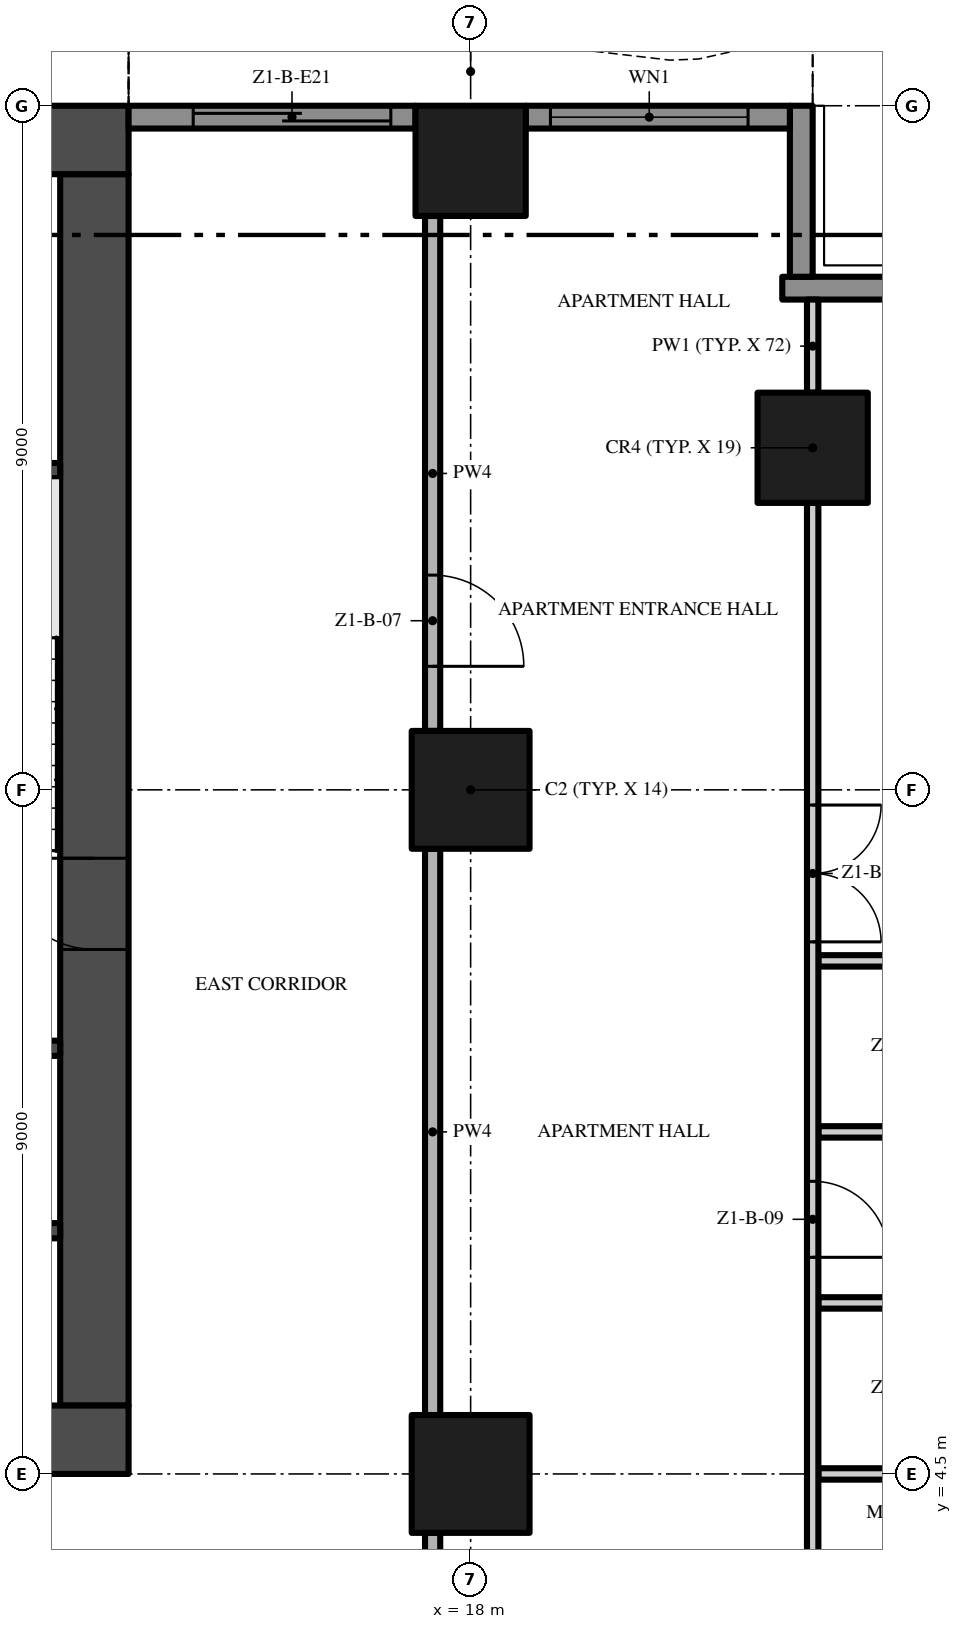
"""IFC4 building model, lengths in metres.
Left out: names, types, materials, properties, quantities, classifications, styles, units other than length and angle.
Written with IfcOpenShell. Run it as: python <this file> out.ifc"""

import sys

from ifc_helpers import new_model, si_unit, direction, frame, frame_2d, origin, origin_2d, place, context, subcontext, project, spatial, polyline, rectangle, outline, extrude, element, fill, save


model = new_model("IFC4")
c1 = context("Model", 3, precision=1e-05, world=origin(), true_north=direction((0.0, 1.0)))
c2 = subcontext(c1, "Body", "Model", "MODEL_VIEW")
j1 = project(units=[si_unit("LENGTHUNIT", "METRE"), si_unit("PLANEANGLEUNIT", "RADIAN")], contexts=[c1])
p1 = place(None, origin())
s1 = spatial("IfcSite", under=j1, at=p1, CompositionType="ELEMENT")
p2 = place(p1, origin())
s2 = spatial("IfcBuilding", under=s1, at=p2, CompositionType="ELEMENT")
p3 = place(p2, frame((0.0, 0.0, 34.0)))
s3 = spatial("IfcBuildingStorey", under=s2, at=p3, CompositionType="ELEMENT", Elevation=34.0)
p4 = place(p3, frame((-13.5, 4.95, -0.3), z_axis=(0.0, 0.0, 1.0), x_axis=(1.0, 0.0, 0.0)))
e1 = element("IfcWall", 1, at=p4, inside=s3, PredefinedType="SHEAR", context=c2, shape_type="SweptSolid", body=[
    extrude(rectangle(XDim=27.0, YDim=0.9, at=frame_2d((13.5, 0.0))), origin(), (0.0, 0.0, 1.0), 3.8),
])
p5 = place(p4, frame((12.0, 0.0, 0.3)))
e2 = element("IfcOpeningElement", 2, at=p5, cuts=e1, PredefinedType="OPENING", context=c2, shape_type="SweptSolid", body=[
    extrude(rectangle(XDim=3.0, YDim=2.4, at=frame_2d((1.5, 1.2))), frame((0.0, 0.46, 0.0), z_axis=(0.0, -1.0, 0.0), x_axis=(1.0, 0.0, 0.0)), (0.0, 0.0, 1.0), 0.92),
])
p6 = place(p4, frame((4.9, 0.0, 0.3)))
e3 = element("IfcOpeningElement", 3, at=p6, cuts=e1, PredefinedType="OPENING", context=c2, shape_type="SweptSolid", body=[
    extrude(rectangle(XDim=1.2, YDim=2.2, at=frame_2d((0.6, 1.1))), frame((0.0, 0.46, 0.0), z_axis=(0.0, -1.0, 0.0), x_axis=(1.0, 0.0, 0.0)), (0.0, 0.0, 1.0), 0.92),
])
p7 = place(p4, frame((20.75, 0.0, 0.3)))
e4 = element("IfcOpeningElement", 4, at=p7, cuts=e1, PredefinedType="OPENING", context=c2, shape_type="SweptSolid", body=[
    extrude(rectangle(XDim=1.5, YDim=2.2, at=frame_2d((0.75, 1.1))), frame((0.0, 0.46, 0.0), z_axis=(0.0, -1.0, 0.0), x_axis=(1.0, 0.0, 0.0)), (0.0, 0.0, 1.0), 0.92),
])
p8 = place(p4, frame((17.4, 0.0, 0.3)))
e5 = element("IfcOpeningElement", 5, at=p8, cuts=e1, PredefinedType="OPENING", context=c2, shape_type="SweptSolid", body=[
    extrude(rectangle(XDim=1.2, YDim=2.2, at=frame_2d((0.6, 1.1))), frame((0.0, 0.46, 0.0), z_axis=(0.0, -1.0, 0.0), x_axis=(1.0, 0.0, 0.0)), (0.0, 0.0, 1.0), 0.92),
])
p9 = place(p3, frame((13.05, 5.4, -0.3), z_axis=(0.0, 0.0, 1.0), x_axis=(0.0, 1.0, 0.0)))
e6 = element("IfcWall", 6, at=p9, inside=s3, PredefinedType="SHEAR", context=c2, shape_type="SweptSolid", body=[
    extrude(rectangle(XDim=16.2, YDim=0.9, at=frame_2d((8.1, 0.0))), origin(), (0.0, 0.0, 1.0), 3.8),
])
p10 = place(p9, frame((6.0, 0.0, 0.3)))
e7 = element("IfcOpeningElement", 7, at=p10, cuts=e6, PredefinedType="OPENING", context=c2, shape_type="SweptSolid", body=[
    extrude(rectangle(XDim=1.2, YDim=2.2, at=frame_2d((0.6, 1.1))), frame((0.0, 0.46, 0.0), z_axis=(0.0, -1.0, 0.0), x_axis=(1.0, 0.0, 0.0)), (0.0, 0.0, 1.0), 0.92),
])
p11 = place(p3, frame((13.5, 22.05, -0.3), z_axis=(0.0, 0.0, 1.0), x_axis=(-1.0, 0.0, 0.0)))
e8 = element("IfcWall", 8, at=p11, inside=s3, PredefinedType="SHEAR", context=c2, shape_type="SweptSolid", body=[
    extrude(rectangle(XDim=27.0, YDim=0.9, at=frame_2d((13.5, 0.0))), origin(), (0.0, 0.0, 1.0), 3.8),
])
p12 = place(p3, frame((18.0, 13.5, 0.0), z_axis=(0.0, 0.0, 1.0), x_axis=(1.0, 0.0, 0.0)))
e9 = element("IfcColumn", 9, at=p12, inside=s3, PredefinedType="COLUMN", context=c2, shape_type="SweptSolid", body=[
    extrude(rectangle(XDim=1.55, YDim=1.55, at=origin_2d()), origin(), (0.0, 0.0, 1.0), 3.5),
])
p13 = place(p3, frame((18.0, 21.775, 0.0), z_axis=(0.0, 0.0, 1.0), x_axis=(1.0, 0.0, 0.0)))
e10 = element("IfcColumn", 10, at=p13, inside=s3, PredefinedType="COLUMN", context=c2, shape_type="SweptSolid", body=[
    extrude(rectangle(XDim=1.45, YDim=1.45, at=origin_2d()), origin(), (0.0, 0.0, 1.0), 3.5),
])
p14 = place(p3, frame((18.0, 4.5, 0.0), z_axis=(0.0, 0.0, 1.0), x_axis=(1.0, 0.0, 0.0)))
e11 = element("IfcColumn", 11, at=p14, inside=s3, PredefinedType="COLUMN", context=c2, shape_type="SweptSolid", body=[
    extrude(rectangle(XDim=1.55, YDim=1.55, at=origin_2d()), origin(), (0.0, 0.0, 1.0), 3.5),
])
p15 = place(p3, frame((22.5, 18.0, 0.0), z_axis=(0.0, 0.0, 1.0), x_axis=(1.0, 0.0, 0.0)))
e12 = element("IfcColumn", 12, at=p15, inside=s3, PredefinedType="COLUMN", context=c2, shape_type="SweptSolid", body=[
    extrude(rectangle(XDim=1.45, YDim=1.45, at=origin_2d()), origin(), (0.0, 0.0, 1.0), 3.5),
])
p16 = place(p3, frame((22.1, 20.1, 0.0), z_axis=(0.0, 0.0, 1.0), x_axis=(1.0, 0.0, 0.0)))
e13 = element("IfcWall", 13, at=p16, inside=s3, PredefinedType="SOLIDWALL", context=c2, shape_type="SweptSolid", body=[
    extrude(rectangle(XDim=2.35, YDim=0.3, at=frame_2d((1.175, 0.0))), origin(), (0.0, 0.0, 1.0), 3.5),
])
p17 = place(p3, frame((22.35, 22.5, 0.0), z_axis=(0.0, 0.0, 1.0), x_axis=(0.0, -1.0, 0.0)))
e14 = element("IfcWall", 14, at=p17, inside=s3, PredefinedType="SOLIDWALL", context=c2, shape_type="SweptSolid", body=[
    extrude(rectangle(XDim=2.25, YDim=0.3, at=frame_2d((1.125, 0.0))), origin(), (0.0, 0.0, 1.0), 3.5),
])
p18 = place(p3, frame((18.725, 22.35, 0.0), z_axis=(0.0, 0.0, 1.0), x_axis=(1.0, 0.0, 0.0)))
e15 = element("IfcWall", 15, at=p18, inside=s3, PredefinedType="SOLIDWALL", context=c2, shape_type="SweptSolid", body=[
    extrude(rectangle(XDim=3.475, YDim=0.3, at=frame_2d((1.738, 0.0))), origin(), (0.0, 0.0, 1.0), 3.5),
])
p19 = place(p18, frame((0.325, 0.0, 0.45)))
e16 = element("IfcOpeningElement", 16, at=p19, cuts=e15, PredefinedType="OPENING", context=c2, shape_type="SweptSolid", body=[
    extrude(rectangle(XDim=2.6, YDim=2.65, at=frame_2d((1.3, 1.325))), frame((0.0, 0.16, 0.0), z_axis=(0.0, -1.0, 0.0), x_axis=(1.0, 0.0, 0.0)), (0.0, 0.0, 1.0), 0.32),
])
p20 = place(p3, frame((13.5, 22.35, 0.0), z_axis=(0.0, 0.0, 1.0), x_axis=(1.0, 0.0, 0.0)))
e17 = element("IfcWall", 17, at=p20, inside=s3, PredefinedType="SOLIDWALL", context=c2, shape_type="SweptSolid", body=[
    extrude(rectangle(XDim=3.775, YDim=0.3, at=frame_2d((1.887, 0.0))), origin(), (0.0, 0.0, 1.0), 3.5),
])
p21 = place(p20, frame((0.85, 0.0, 0.0)))
e18 = element("IfcOpeningElement", 18, at=p21, cuts=e17, PredefinedType="OPENING", context=c2, shape_type="SweptSolid", body=[
    extrude(rectangle(XDim=2.6, YDim=2.4, at=frame_2d((1.3, 1.2))), frame((0.0, 0.16, 0.0), z_axis=(0.0, -1.0, 0.0), x_axis=(1.0, 0.0, 0.0)), (0.0, 0.0, 1.0), 0.32),
])
p22 = place(p3, origin())
e19 = element("IfcWall", 19, at=p22, inside=s3, PredefinedType="USERDEFINED", context=c2, shape_type="SweptSolid", body=[
    extrude(outline(polyline([(22.5, 23.451), (21.0, 23.115), (20.625, 23.1), (19.5, 23.231), (18.0, 23.755), (16.5, 24.488), (15.0, 25.149), (13.5, 25.485), (13.445, 25.241), (14.921, 24.91), (16.395, 24.261), (17.904, 23.524), (19.444, 22.986), (20.615, 22.849), (21.033, 22.866), (22.555, 23.208), (22.5, 23.451)])), origin(), (0.0, 0.0, 1.0), 0.9),
])
for number, where, z_axis, x_axis in (
    (20, (9.65, 7.7, 0.0), (0.0, 0.0, 1.0), (1.0, 0.0, 0.0)),
    (21, (9.65, 10.1, 0.0), (0.0, 0.0, 1.0), (1.0, 0.0, 0.0)),
    (22, (9.65, 17.7, 0.0), (0.0, 0.0, 1.0), (1.0, 0.0, 0.0)),
):
    element("IfcWall", number, at=place(p3, frame(where, z_axis=z_axis, x_axis=x_axis)), inside=s3, PredefinedType="SHEAR", context=c2, shape_type="SweptSolid", body=[
        extrude(rectangle(XDim=2.95, YDim=0.2, at=frame_2d((1.475, 0.0))), origin(), (0.0, 0.0, 1.0), 3.5),
    ])
p23 = place(p3, frame((22.575, 4.5, 0.0), z_axis=(0.0, 0.0, 1.0), x_axis=(1.0, 0.0, 0.0)))
e23 = element("IfcWall", 23, at=p23, inside=s3, PredefinedType="PARTITIONING", context=c2, shape_type="SweptSolid", body=[
    extrude(rectangle(XDim=2.975, YDim=0.15, at=frame_2d((1.488, 0.0))), origin(), (0.0, 0.0, 1.0), 3.5),
])
p24 = place(p3, frame((22.575, 6.75, 0.0), z_axis=(0.0, 0.0, 1.0), x_axis=(1.0, 0.0, 0.0)))
e24 = element("IfcWall", 24, at=p24, inside=s3, PredefinedType="PARTITIONING", context=c2, shape_type="SweptSolid", body=[
    extrude(rectangle(XDim=1.875, YDim=0.15, at=frame_2d((0.938, 0.0))), origin(), (0.0, 0.0, 1.0), 3.5),
])
p25 = place(p3, frame((22.575, 9.0, 0.0), z_axis=(0.0, 0.0, 1.0), x_axis=(1.0, 0.0, 0.0)))
e25 = element("IfcWall", 25, at=p25, inside=s3, PredefinedType="PARTITIONING", context=c2, shape_type="SweptSolid", body=[
    extrude(rectangle(XDim=4.125, YDim=0.15, at=frame_2d((2.062, 0.0))), origin(), (0.0, 0.0, 1.0), 3.5),
])
p26 = place(p3, frame((22.575, 11.25, 0.0), z_axis=(0.0, 0.0, 1.0), x_axis=(1.0, 0.0, 0.0)))
e26 = element("IfcWall", 26, at=p26, inside=s3, PredefinedType="PARTITIONING", context=c2, shape_type="SweptSolid", body=[
    extrude(rectangle(XDim=1.875, YDim=0.15, at=frame_2d((0.938, 0.0))), origin(), (0.0, 0.0, 1.0), 3.5),
])
p27 = place(p3, frame((17.5, -0.2, 0.0), z_axis=(0.0, 0.0, 1.0), x_axis=(0.0, 1.0, 0.0)))
e27 = element("IfcWall", 27, at=p27, inside=s3, PredefinedType="PARTITIONING", context=c2, shape_type="SweptSolid", body=[
    extrude(rectangle(XDim=3.925, YDim=0.2, at=frame_2d((1.962, 0.0))), origin(), (0.0, 0.0, 1.0), 3.5),
])
p28 = place(p3, frame((17.5, 5.275, 0.0), z_axis=(0.0, 0.0, 1.0), x_axis=(0.0, 1.0, 0.0)))
e28 = element("IfcWall", 28, at=p28, inside=s3, PredefinedType="PARTITIONING", context=c2, shape_type="SweptSolid", body=[
    extrude(rectangle(XDim=7.45, YDim=0.2, at=frame_2d((3.725, 0.0))), origin(), (0.0, 0.0, 1.0), 3.5),
])
p29 = place(p3, frame((17.5, 21.05, 0.0), z_axis=(0.0, 0.0, 1.0), x_axis=(0.0, -1.0, 0.0)))
e29 = element("IfcWall", 29, at=p29, inside=s3, PredefinedType="PARTITIONING", context=c2, shape_type="SweptSolid", body=[
    extrude(rectangle(XDim=6.775, YDim=0.2, at=frame_2d((3.388, 0.0))), origin(), (0.0, 0.0, 1.0), 3.5),
])
p30 = place(p29, frame((4.725, 0.0, 0.0)))
e30 = element("IfcOpeningElement", 30, at=p30, cuts=e29, PredefinedType="OPENING", context=c2, shape_type="SweptSolid", body=[
    extrude(rectangle(XDim=1.2, YDim=2.4, at=frame_2d((0.6, 1.2))), frame((0.0, 0.11, 0.0), z_axis=(0.0, -1.0, 0.0), x_axis=(1.0, 0.0, 0.0)), (0.0, 0.0, 1.0), 0.22),
])
p31 = place(p3, frame((22.5, 17.275, 0.0), z_axis=(0.0, 0.0, 1.0), x_axis=(0.0, -1.0, 0.0)))
e31 = element("IfcWall", 31, at=p31, inside=s3, PredefinedType="PARTITIONING", context=c2, shape_type="SweptSolid", body=[
    extrude(rectangle(XDim=17.175, YDim=0.15, at=frame_2d((8.588, 0.0))), origin(), (0.0, 0.0, 1.0), 3.5),
])
p32 = place(p31, frame((14.525, 0.0, 0.0)))
e32 = element("IfcOpeningElement", 32, at=p32, cuts=e31, PredefinedType="OPENING", context=c2, shape_type="SweptSolid", body=[
    extrude(rectangle(XDim=1.0, YDim=2.4, at=frame_2d((0.5, 1.2))), frame((0.0, 0.085, 0.0), z_axis=(0.0, -1.0, 0.0), x_axis=(1.0, 0.0, 0.0)), (0.0, 0.0, 1.0), 0.17),
])
p33 = place(p31, frame((8.925, 0.0, 0.0)))
e33 = element("IfcOpeningElement", 33, at=p33, cuts=e31, PredefinedType="OPENING", context=c2, shape_type="SweptSolid", body=[
    extrude(rectangle(XDim=1.0, YDim=2.4, at=frame_2d((0.5, 1.2))), frame((0.0, 0.085, 0.0), z_axis=(0.0, -1.0, 0.0), x_axis=(1.0, 0.0, 0.0)), (0.0, 0.0, 1.0), 0.17),
])
p34 = place(p31, frame((3.975, 0.0, 0.0)))
e34 = element("IfcOpeningElement", 34, at=p34, cuts=e31, PredefinedType="OPENING", context=c2, shape_type="SweptSolid", body=[
    extrude(rectangle(XDim=1.8, YDim=2.4, at=frame_2d((0.9, 1.2))), frame((0.0, 0.085, 0.0), z_axis=(0.0, -1.0, 0.0), x_axis=(1.0, 0.0, 0.0)), (0.0, 0.0, 1.0), 0.17),
])
p35 = place(p3, frame((22.5, 18.725, 0.0), z_axis=(0.0, 0.0, 1.0), x_axis=(0.0, 1.0, 0.0)))
e35 = element("IfcWall", 35, at=p35, inside=s3, PredefinedType="PARTITIONING", context=c2, shape_type="SweptSolid", body=[
    extrude(rectangle(XDim=1.225, YDim=0.15, at=frame_2d((0.613, 0.0))), origin(), (0.0, 0.0, 1.0), 3.5),
])
p36 = place(p19, origin())
e36 = element("IfcWindow", 36, at=p36, inside=s3, PartitioningType="SINGLE_PANEL", PredefinedType="WINDOW", context=c2, shape_type="SweptSolid", body=[
    extrude(rectangle(XDim=2.6, YDim=2.65, at=frame_2d((1.3, 1.325))), frame((0.0, 0.03, 0.0), z_axis=(0.0, -1.0, 0.0), x_axis=(1.0, 0.0, 0.0)), (0.0, 0.0, 1.0), 0.06),
])
fill(e16, e36)
p37 = place(p21, origin())
e37 = element("IfcDoor", 37, at=p37, inside=s3, OperationType="SINGLE_SWING_LEFT", PredefinedType="DOOR", context=c2, shape_type="SweptSolid", body=[
    extrude(rectangle(XDim=2.6, YDim=2.4, at=frame_2d((1.3, 1.2))), frame((0.0, 0.025, 0.0), z_axis=(0.0, -1.0, 0.0), x_axis=(1.0, 0.0, 0.0)), (0.0, 0.0, 1.0), 0.05),
])
fill(e18, e37)
p38 = place(p10, frame((1.2, 0.0, 0.0), z_axis=(0.0, 0.0, 1.0), x_axis=(-1.0, 0.0, 0.0)))
e38 = element("IfcDoor", 38, at=p38, inside=s3, OperationType="SINGLE_SWING_LEFT", PredefinedType="DOOR", context=c2, shape_type="SweptSolid", body=[
    extrude(rectangle(XDim=1.2, YDim=2.2, at=frame_2d((0.6, 1.1))), frame((0.0, 0.025, 0.0), z_axis=(0.0, -1.0, 0.0), x_axis=(1.0, 0.0, 0.0)), (0.0, 0.0, 1.0), 0.05),
])
fill(e7, e38)
p39 = place(p30, origin())
e39 = element("IfcDoor", 39, at=p39, inside=s3, OperationType="SINGLE_SWING_RIGHT", PredefinedType="DOOR", context=c2, shape_type="SweptSolid", body=[
    extrude(rectangle(XDim=1.2, YDim=2.4, at=frame_2d((0.6, 1.2))), frame((0.0, 0.025, 0.0), z_axis=(0.0, -1.0, 0.0), x_axis=(1.0, 0.0, 0.0)), (0.0, 0.0, 1.0), 0.05),
])
fill(e30, e39)
p40 = place(p33, origin())
e40 = element("IfcDoor", 40, at=p40, inside=s3, OperationType="SINGLE_SWING_RIGHT", PredefinedType="DOOR", context=c2, shape_type="SweptSolid", body=[
    extrude(rectangle(XDim=1.0, YDim=2.4, at=frame_2d((0.5, 1.2))), frame((0.0, 0.025, 0.0), z_axis=(0.0, -1.0, 0.0), x_axis=(1.0, 0.0, 0.0)), (0.0, 0.0, 1.0), 0.05),
])
fill(e33, e40)
p41 = place(p34, origin())
e41 = element("IfcDoor", 41, at=p41, inside=s3, OperationType="DOUBLE_DOOR_SINGLE_SWING", PredefinedType="DOOR", context=c2, shape_type="SweptSolid", body=[
    extrude(rectangle(XDim=1.8, YDim=2.4, at=frame_2d((0.9, 1.2))), frame((0.0, 0.025, 0.0), z_axis=(0.0, -1.0, 0.0), x_axis=(1.0, 0.0, 0.0)), (0.0, 0.0, 1.0), 0.05),
])
fill(e34, e41)
save(model, sys.argv[1])
